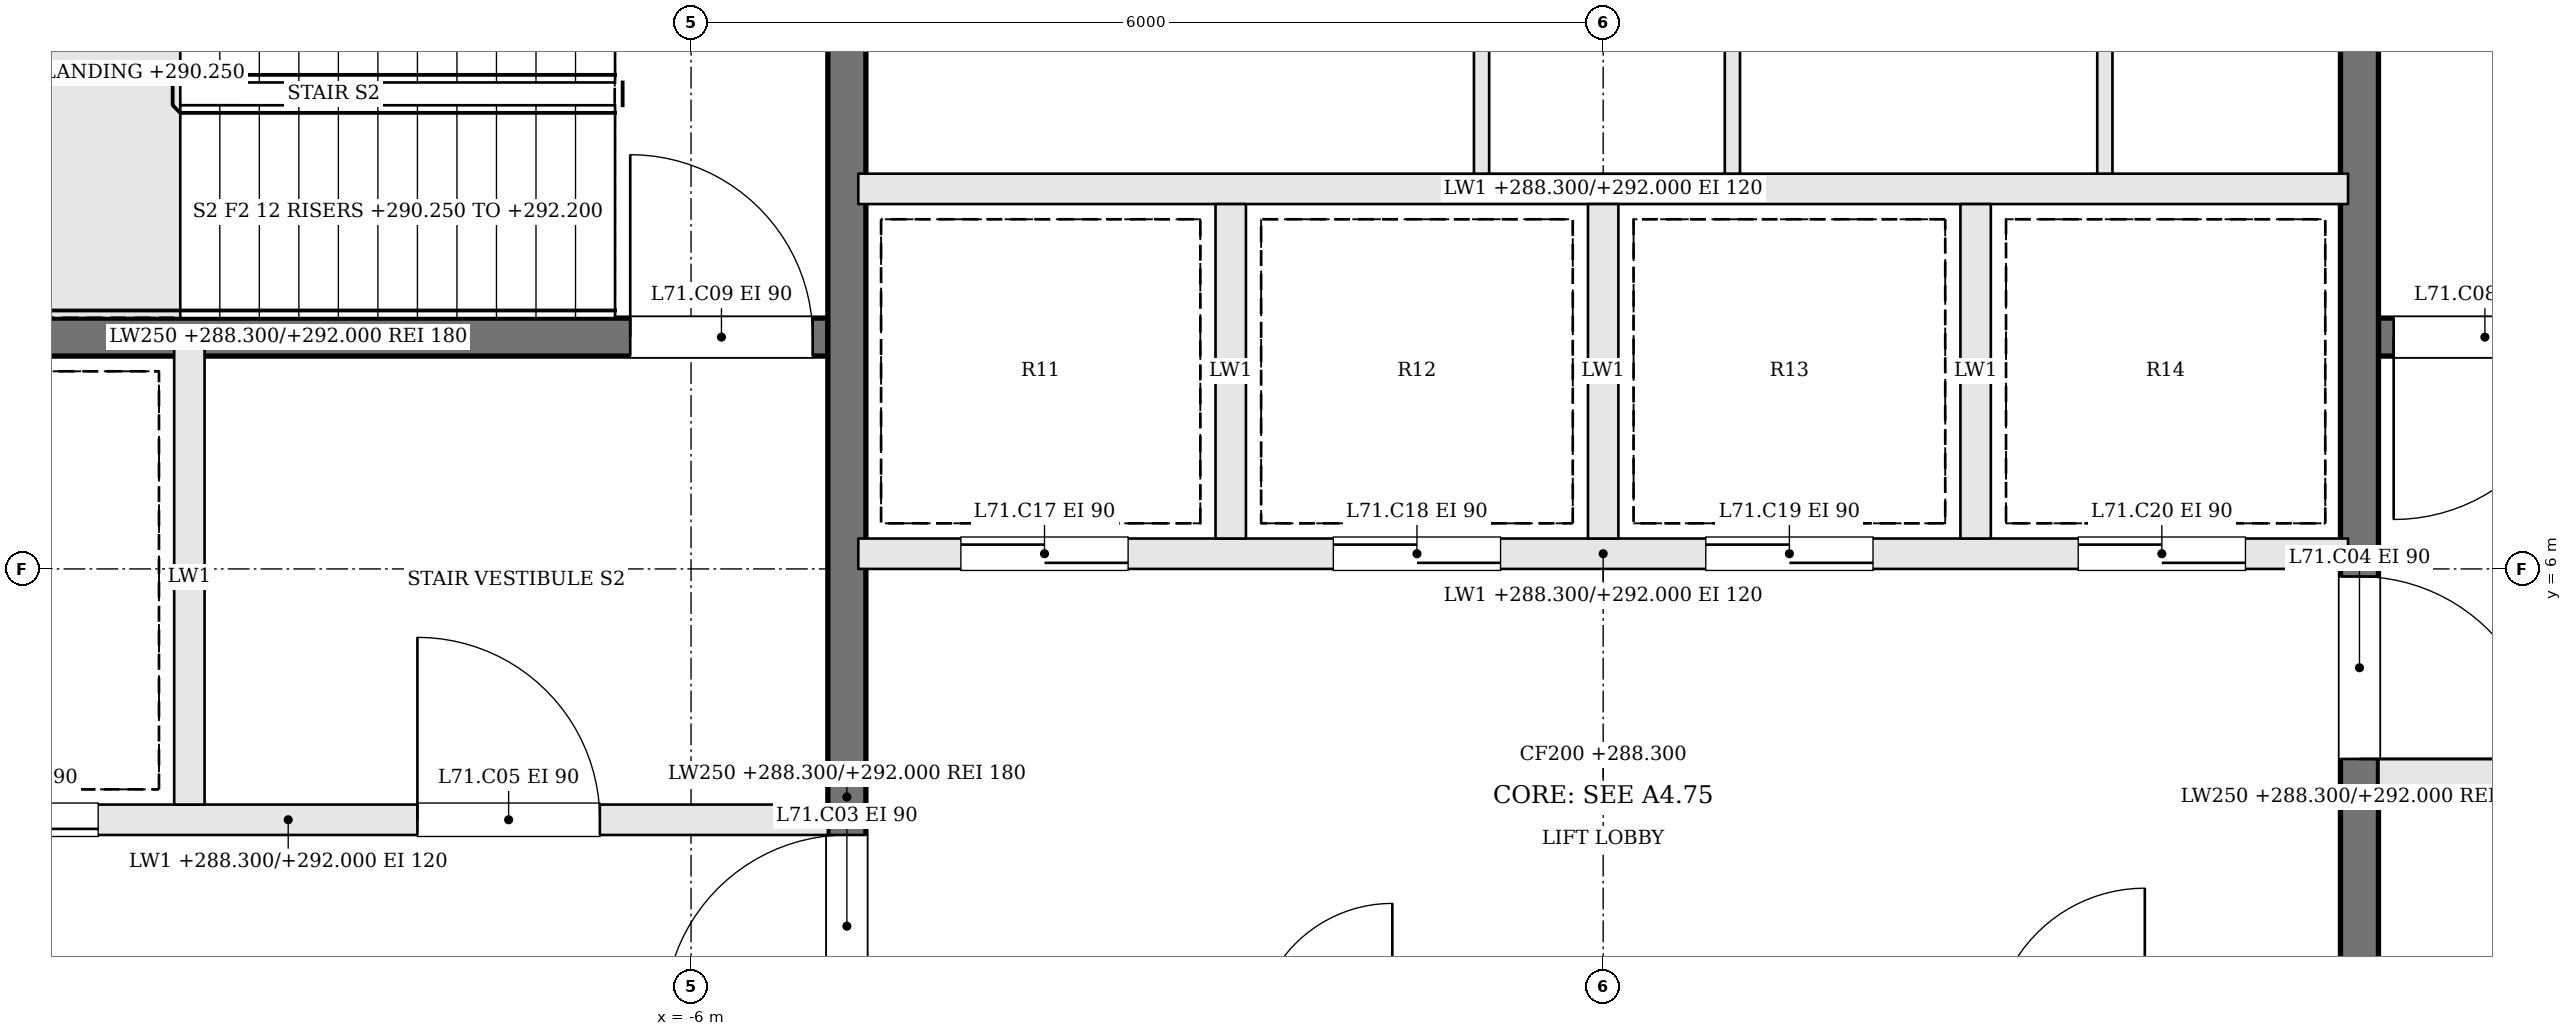
"""IFC4 building model, lengths in metres.
Left out: names, types, materials, properties, quantities, classifications, styles, units other than length and angle.
Written with IfcOpenShell. Run it as: python <this file> out.ifc"""

import sys

from ifc_helpers import new_model, si_unit, direction, frame, frame_2d, origin, place, context, subcontext, project, spatial, rectangle, extrude, element, fill, save


model = new_model("IFC4")
c1 = context("Model", 3, precision=1e-05, world=origin(), true_north=direction((0.0, 1.0)))
c2 = subcontext(c1, "Body", "Model", "MODEL_VIEW")
j1 = project(units=[si_unit("LENGTHUNIT", "METRE"), si_unit("PLANEANGLEUNIT", "RADIAN")], contexts=[c1])
p1 = place(None, origin())
s1 = spatial("IfcSite", under=j1, at=p1, CompositionType="ELEMENT")
p2 = place(p1, origin())
s2 = spatial("IfcBuilding", under=s1, at=p2, CompositionType="ELEMENT")
p3 = place(p2, frame((0.0, 0.0, 288.3)))
s3 = spatial("IfcBuildingStorey", under=s2, at=p3, CompositionType="ELEMENT", Elevation=288.3)
p4 = place(p3, frame((12.2, 7.525, 0.0), z_axis=(0.0, 0.0, 1.0), x_axis=(-1.0, 0.0, 0.0)))
e1 = element("IfcWall", 1, at=p4, inside=s3, PredefinedType="SOLIDWALL", context=c2, shape_type="SweptSolid", body=[
    extrude(rectangle(XDim=7.1, YDim=0.25, at=frame_2d((3.55, 0.0))), origin(), (0.0, 0.0, 1.0), 3.7),
])
p5 = place(p4, frame((5.8, 0.0, 0.0)))
e2 = element("IfcOpeningElement", 2, at=p5, cuts=e1, PredefinedType="OPENING", context=c2, shape_type="SweptSolid", body=[
    extrude(rectangle(XDim=1.2, YDim=2.1, at=frame_2d((0.6, 1.05))), frame((0.0, 0.135, 0.0), z_axis=(0.0, -1.0, 0.0), x_axis=(1.0, 0.0, 0.0)), (0.0, 0.0, 1.0), 0.27),
])
p6 = place(p3, frame((-12.2, 4.35, 0.0), z_axis=(0.0, 0.0, 1.0), x_axis=(1.0, 0.0, 0.0)))
e3 = element("IfcWall", 3, at=p6, inside=s3, PredefinedType="SOLIDWALL", context=c2, shape_type="SweptSolid", body=[
    extrude(rectangle(XDim=7.1, YDim=0.2, at=frame_2d((3.55, 0.0))), origin(), (0.0, 0.0, 1.0), 3.7),
])
p7 = place(p6, frame((4.4, 0.0, 0.0)))
e4 = element("IfcOpeningElement", 4, at=p7, cuts=e3, PredefinedType="OPENING", context=c2, shape_type="SweptSolid", body=[
    extrude(rectangle(XDim=1.2, YDim=2.1, at=frame_2d((0.6, 1.05))), frame((0.0, 0.11, 0.0), z_axis=(0.0, -1.0, 0.0), x_axis=(1.0, 0.0, 0.0)), (0.0, 0.0, 1.0), 0.22),
])
p8 = place(p6, frame((1.1, 0.0, 0.0)))
e5 = element("IfcOpeningElement", 5, at=p8, cuts=e3, PredefinedType="OPENING", context=c2, shape_type="SweptSolid", body=[
    extrude(rectangle(XDim=1.2, YDim=2.1, at=frame_2d((0.6, 1.05))), frame((0.0, 0.11, 0.0), z_axis=(0.0, -1.0, 0.0), x_axis=(1.0, 0.0, 0.0)), (0.0, 0.0, 1.0), 0.22),
])
p9 = place(p3, frame((12.2, 4.65, 0.0), z_axis=(0.0, 0.0, 1.0), x_axis=(-1.0, 0.0, 0.0)))
e6 = element("IfcWall", 6, at=p9, inside=s3, PredefinedType="SOLIDWALL", context=c2, shape_type="SweptSolid", body=[
    extrude(rectangle(XDim=7.1, YDim=0.2, at=frame_2d((3.55, 0.0))), origin(), (0.0, 0.0, 1.0), 3.7),
])
p10 = place(p9, frame((4.4, 0.0, 0.0)))
e7 = element("IfcOpeningElement", 7, at=p10, cuts=e6, PredefinedType="OPENING", context=c2, shape_type="SweptSolid", body=[
    extrude(rectangle(XDim=1.2, YDim=2.1, at=frame_2d((0.6, 1.05))), frame((0.0, 0.11, 0.0), z_axis=(0.0, -1.0, 0.0), x_axis=(1.0, 0.0, 0.0)), (0.0, 0.0, 1.0), 0.22),
])
p11 = place(p9, frame((1.1, 0.0, 0.0)))
e8 = element("IfcOpeningElement", 8, at=p11, cuts=e6, PredefinedType="OPENING", context=c2, shape_type="SweptSolid", body=[
    extrude(rectangle(XDim=1.2, YDim=2.1, at=frame_2d((0.6, 1.05))), frame((0.0, 0.11, 0.0), z_axis=(0.0, -1.0, 0.0), x_axis=(1.0, 0.0, 0.0)), (0.0, 0.0, 1.0), 0.22),
])
p12 = place(p3, frame((-12.2, 7.525, 0.0), z_axis=(0.0, 0.0, 1.0), x_axis=(1.0, 0.0, 0.0)))
e9 = element("IfcWall", 9, at=p12, inside=s3, PredefinedType="SOLIDWALL", context=c2, shape_type="SweptSolid", body=[
    extrude(rectangle(XDim=7.1, YDim=0.25, at=frame_2d((3.55, 0.0))), origin(), (0.0, 0.0, 1.0), 3.7),
])
p13 = place(p12, frame((5.8, 0.0, 0.0)))
e10 = element("IfcOpeningElement", 10, at=p13, cuts=e9, PredefinedType="OPENING", context=c2, shape_type="SweptSolid", body=[
    extrude(rectangle(XDim=1.2, YDim=2.1, at=frame_2d((0.6, 1.05))), frame((0.0, 0.135, 0.0), z_axis=(0.0, -1.0, 0.0), x_axis=(1.0, 0.0, 0.0)), (0.0, 0.0, 1.0), 0.27),
])
p14 = place(p3, frame((-9.3, 4.45, 0.0), z_axis=(0.0, 0.0, 1.0), x_axis=(0.0, 1.0, 0.0)))
e11 = element("IfcWall", 11, at=p14, inside=s3, PredefinedType="SOLIDWALL", context=c2, shape_type="SweptSolid", body=[
    extrude(rectangle(XDim=3.0, YDim=0.2, at=frame_2d((1.5, 0.0))), origin(), (0.0, 0.0, 1.0), 3.7),
])
p15 = place(p3, frame((-4.975, -2.2, 0.0), z_axis=(0.0, 0.0, 1.0), x_axis=(0.0, 1.0, 0.0)))
e12 = element("IfcWall", 12, at=p15, inside=s3, PredefinedType="SOLIDWALL", context=c2, shape_type="SweptSolid", body=[
    extrude(rectangle(XDim=13.4, YDim=0.25, at=frame_2d((6.7, 0.0))), origin(), (0.0, 0.0, 1.0), 3.7),
])
p16 = place(p15, frame((5.25, 0.0, 0.0)))
e13 = element("IfcOpeningElement", 13, at=p16, cuts=e12, PredefinedType="OPENING", context=c2, shape_type="SweptSolid", body=[
    extrude(rectangle(XDim=1.2, YDim=2.1, at=frame_2d((0.6, 1.05))), frame((0.0, 0.135, 0.0), z_axis=(0.0, -1.0, 0.0), x_axis=(1.0, 0.0, 0.0)), (0.0, 0.0, 1.0), 0.27),
])
p17 = place(p3, frame((4.975, 11.2, 0.0), z_axis=(0.0, 0.0, 1.0), x_axis=(0.0, -1.0, 0.0)))
e14 = element("IfcWall", 14, at=p17, inside=s3, PredefinedType="SOLIDWALL", context=c2, shape_type="SweptSolid", body=[
    extrude(rectangle(XDim=13.4, YDim=0.25, at=frame_2d((6.7, 0.0))), origin(), (0.0, 0.0, 1.0), 3.7),
])
p18 = place(p17, frame((5.25, 0.0, 0.0)))
e15 = element("IfcOpeningElement", 15, at=p18, cuts=e14, PredefinedType="OPENING", context=c2, shape_type="SweptSolid", body=[
    extrude(rectangle(XDim=1.2, YDim=2.1, at=frame_2d((0.6, 1.05))), frame((0.0, 0.135, 0.0), z_axis=(0.0, -1.0, 0.0), x_axis=(1.0, 0.0, 0.0)), (0.0, 0.0, 1.0), 0.27),
])
p19 = place(p3, frame((-4.9, 6.1, 0.0), z_axis=(0.0, 0.0, 1.0), x_axis=(1.0, 0.0, 0.0)))
e16 = element("IfcWall", 16, at=p19, inside=s3, PredefinedType="SOLIDWALL", context=c2, shape_type="SweptSolid", body=[
    extrude(rectangle(XDim=9.8, YDim=0.2, at=frame_2d((4.9, 0.0))), origin(), (0.0, 0.0, 1.0), 3.7),
])
p20 = place(p19, frame((0.675, 0.0, 0.0)))
e17 = element("IfcOpeningElement", 17, at=p20, cuts=e16, PredefinedType="OPENING", context=c2, shape_type="SweptSolid", body=[
    extrude(rectangle(XDim=1.1, YDim=2.1, at=frame_2d((0.55, 1.05))), frame((0.0, 0.11, 0.0), z_axis=(0.0, -1.0, 0.0), x_axis=(1.0, 0.0, 0.0)), (0.0, 0.0, 1.0), 0.22),
])
p21 = place(p19, frame((3.125, 0.0, 0.0)))
e18 = element("IfcOpeningElement", 18, at=p21, cuts=e16, PredefinedType="OPENING", context=c2, shape_type="SweptSolid", body=[
    extrude(rectangle(XDim=1.1, YDim=2.1, at=frame_2d((0.55, 1.05))), frame((0.0, 0.11, 0.0), z_axis=(0.0, -1.0, 0.0), x_axis=(1.0, 0.0, 0.0)), (0.0, 0.0, 1.0), 0.22),
])
p22 = place(p19, frame((5.575, 0.0, 0.0)))
e19 = element("IfcOpeningElement", 19, at=p22, cuts=e16, PredefinedType="OPENING", context=c2, shape_type="SweptSolid", body=[
    extrude(rectangle(XDim=1.1, YDim=2.1, at=frame_2d((0.55, 1.05))), frame((0.0, 0.11, 0.0), z_axis=(0.0, -1.0, 0.0), x_axis=(1.0, 0.0, 0.0)), (0.0, 0.0, 1.0), 0.22),
])
p23 = place(p19, frame((8.025, 0.0, 0.0)))
e20 = element("IfcOpeningElement", 20, at=p23, cuts=e16, PredefinedType="OPENING", context=c2, shape_type="SweptSolid", body=[
    extrude(rectangle(XDim=1.1, YDim=2.1, at=frame_2d((0.55, 1.05))), frame((0.0, 0.11, 0.0), z_axis=(0.0, -1.0, 0.0), x_axis=(1.0, 0.0, 0.0)), (0.0, 0.0, 1.0), 0.22),
])
p24 = place(p3, frame((-4.9, 8.5, 0.0), z_axis=(0.0, 0.0, 1.0), x_axis=(1.0, 0.0, 0.0)))
e21 = element("IfcWall", 21, at=p24, inside=s3, PredefinedType="SOLIDWALL", context=c2, shape_type="SweptSolid", body=[
    extrude(rectangle(XDim=9.8, YDim=0.2, at=frame_2d((4.9, 0.0))), origin(), (0.0, 0.0, 1.0), 3.7),
])
for number, where, z_axis, x_axis in (
    (22, (-2.45, 6.2, 0.0), (0.0, 0.0, 1.0), (0.0, 1.0, 0.0)),
    (23, (0.0, 6.2, 0.0), (0.0, 0.0, 1.0), (0.0, 1.0, 0.0)),
    (24, (2.45, 6.2, 0.0), (0.0, 0.0, 1.0), (0.0, 1.0, 0.0)),
):
    element("IfcWall", number, at=place(p3, frame(where, z_axis=z_axis, x_axis=x_axis)), inside=s3, PredefinedType="SOLIDWALL", context=c2, shape_type="SweptSolid", body=[
        extrude(rectangle(XDim=2.2, YDim=0.2, at=frame_2d((1.1, 0.0))), origin(), (0.0, 0.0, 1.0), 3.7),
    ])
for number, where, z_axis, x_axis in (
    (25, (-0.8, 8.6, 0.0), (0.0, 0.0, 1.0), (0.0, 1.0, 0.0)),
    (26, (0.85, 8.6, 0.0), (0.0, 0.0, 1.0), (0.0, 1.0, 0.0)),
    (27, (3.3, 8.6, 0.0), (0.0, 0.0, 1.0), (0.0, 1.0, 0.0)),
):
    element("IfcWall", number, at=place(p3, frame(where, z_axis=z_axis, x_axis=x_axis)), inside=s3, PredefinedType="PARTITIONING", context=c2, shape_type="SweptSolid", body=[
        extrude(rectangle(XDim=2.6, YDim=0.1, at=frame_2d((1.3, 0.0))), origin(), (0.0, 0.0, 1.0), 3.7),
    ])
p25 = place(p16, origin())
e28 = element("IfcDoor", 28, at=p25, inside=s3, OperationType="SINGLE_SWING_LEFT", PredefinedType="DOOR", context=c2, shape_type="SweptSolid", body=[
    extrude(rectangle(XDim=1.2, YDim=2.1, at=frame_2d((0.6, 1.05))), frame((0.0, 0.025, 0.0), z_axis=(0.0, -1.0, 0.0), x_axis=(1.0, 0.0, 0.0)), (0.0, 0.0, 1.0), 0.05),
])
fill(e13, e28)
p26 = place(p18, origin())
e29 = element("IfcDoor", 29, at=p26, inside=s3, OperationType="SINGLE_SWING_RIGHT", PredefinedType="DOOR", context=c2, shape_type="SweptSolid", body=[
    extrude(rectangle(XDim=1.2, YDim=2.1, at=frame_2d((0.6, 1.05))), frame((0.0, 0.025, 0.0), z_axis=(0.0, -1.0, 0.0), x_axis=(1.0, 0.0, 0.0)), (0.0, 0.0, 1.0), 0.05),
])
fill(e15, e29)
p27 = place(p7, origin())
e30 = element("IfcDoor", 30, at=p27, inside=s3, OperationType="SINGLE_SWING_LEFT", PredefinedType="DOOR", context=c2, shape_type="SweptSolid", body=[
    extrude(rectangle(XDim=1.2, YDim=2.1, at=frame_2d((0.6, 1.05))), frame((0.0, 0.025, 0.0), z_axis=(0.0, -1.0, 0.0), x_axis=(1.0, 0.0, 0.0)), (0.0, 0.0, 1.0), 0.05),
])
fill(e4, e30)
p28 = place(p5, origin())
e31 = element("IfcDoor", 31, at=p28, inside=s3, OperationType="SINGLE_SWING_RIGHT", PredefinedType="DOOR", context=c2, shape_type="SweptSolid", body=[
    extrude(rectangle(XDim=1.2, YDim=2.1, at=frame_2d((0.6, 1.05))), frame((0.0, 0.025, 0.0), z_axis=(0.0, -1.0, 0.0), x_axis=(1.0, 0.0, 0.0)), (0.0, 0.0, 1.0), 0.05),
])
fill(e2, e31)
p29 = place(p13, origin())
e32 = element("IfcDoor", 32, at=p29, inside=s3, OperationType="SINGLE_SWING_LEFT", PredefinedType="DOOR", context=c2, shape_type="SweptSolid", body=[
    extrude(rectangle(XDim=1.2, YDim=2.1, at=frame_2d((0.6, 1.05))), frame((0.0, 0.025, 0.0), z_axis=(0.0, -1.0, 0.0), x_axis=(1.0, 0.0, 0.0)), (0.0, 0.0, 1.0), 0.05),
])
fill(e10, e32)
p30 = place(p8, origin())
e33 = element("IfcDoor", 33, at=p30, inside=s3, OperationType="SLIDING_TO_RIGHT", PredefinedType="DOOR", context=c2, shape_type="SweptSolid", body=[
    extrude(rectangle(XDim=1.2, YDim=2.1, at=frame_2d((0.6, 1.05))), frame((0.0, 0.025, 0.0), z_axis=(0.0, -1.0, 0.0), x_axis=(1.0, 0.0, 0.0)), (0.0, 0.0, 1.0), 0.05),
])
fill(e5, e33)
p31 = place(p20, origin())
e34 = element("IfcDoor", 34, at=p31, inside=s3, OperationType="SLIDING_TO_RIGHT", PredefinedType="DOOR", context=c2, shape_type="SweptSolid", body=[
    extrude(rectangle(XDim=1.1, YDim=2.1, at=frame_2d((0.55, 1.05))), frame((0.0, 0.025, 0.0), z_axis=(0.0, -1.0, 0.0), x_axis=(1.0, 0.0, 0.0)), (0.0, 0.0, 1.0), 0.05),
])
fill(e17, e34)
p32 = place(p21, origin())
e35 = element("IfcDoor", 35, at=p32, inside=s3, OperationType="SLIDING_TO_LEFT", PredefinedType="DOOR", context=c2, shape_type="SweptSolid", body=[
    extrude(rectangle(XDim=1.1, YDim=2.1, at=frame_2d((0.55, 1.05))), frame((0.0, 0.025, 0.0), z_axis=(0.0, -1.0, 0.0), x_axis=(1.0, 0.0, 0.0)), (0.0, 0.0, 1.0), 0.05),
])
fill(e18, e35)
p33 = place(p22, origin())
e36 = element("IfcDoor", 36, at=p33, inside=s3, OperationType="SLIDING_TO_RIGHT", PredefinedType="DOOR", context=c2, shape_type="SweptSolid", body=[
    extrude(rectangle(XDim=1.1, YDim=2.1, at=frame_2d((0.55, 1.05))), frame((0.0, 0.025, 0.0), z_axis=(0.0, -1.0, 0.0), x_axis=(1.0, 0.0, 0.0)), (0.0, 0.0, 1.0), 0.05),
])
fill(e19, e36)
p34 = place(p23, origin())
e37 = element("IfcDoor", 37, at=p34, inside=s3, OperationType="SLIDING_TO_LEFT", PredefinedType="DOOR", context=c2, shape_type="SweptSolid", body=[
    extrude(rectangle(XDim=1.1, YDim=2.1, at=frame_2d((0.55, 1.05))), frame((0.0, 0.025, 0.0), z_axis=(0.0, -1.0, 0.0), x_axis=(1.0, 0.0, 0.0)), (0.0, 0.0, 1.0), 0.05),
])
fill(e20, e37)
save(model, sys.argv[1])
